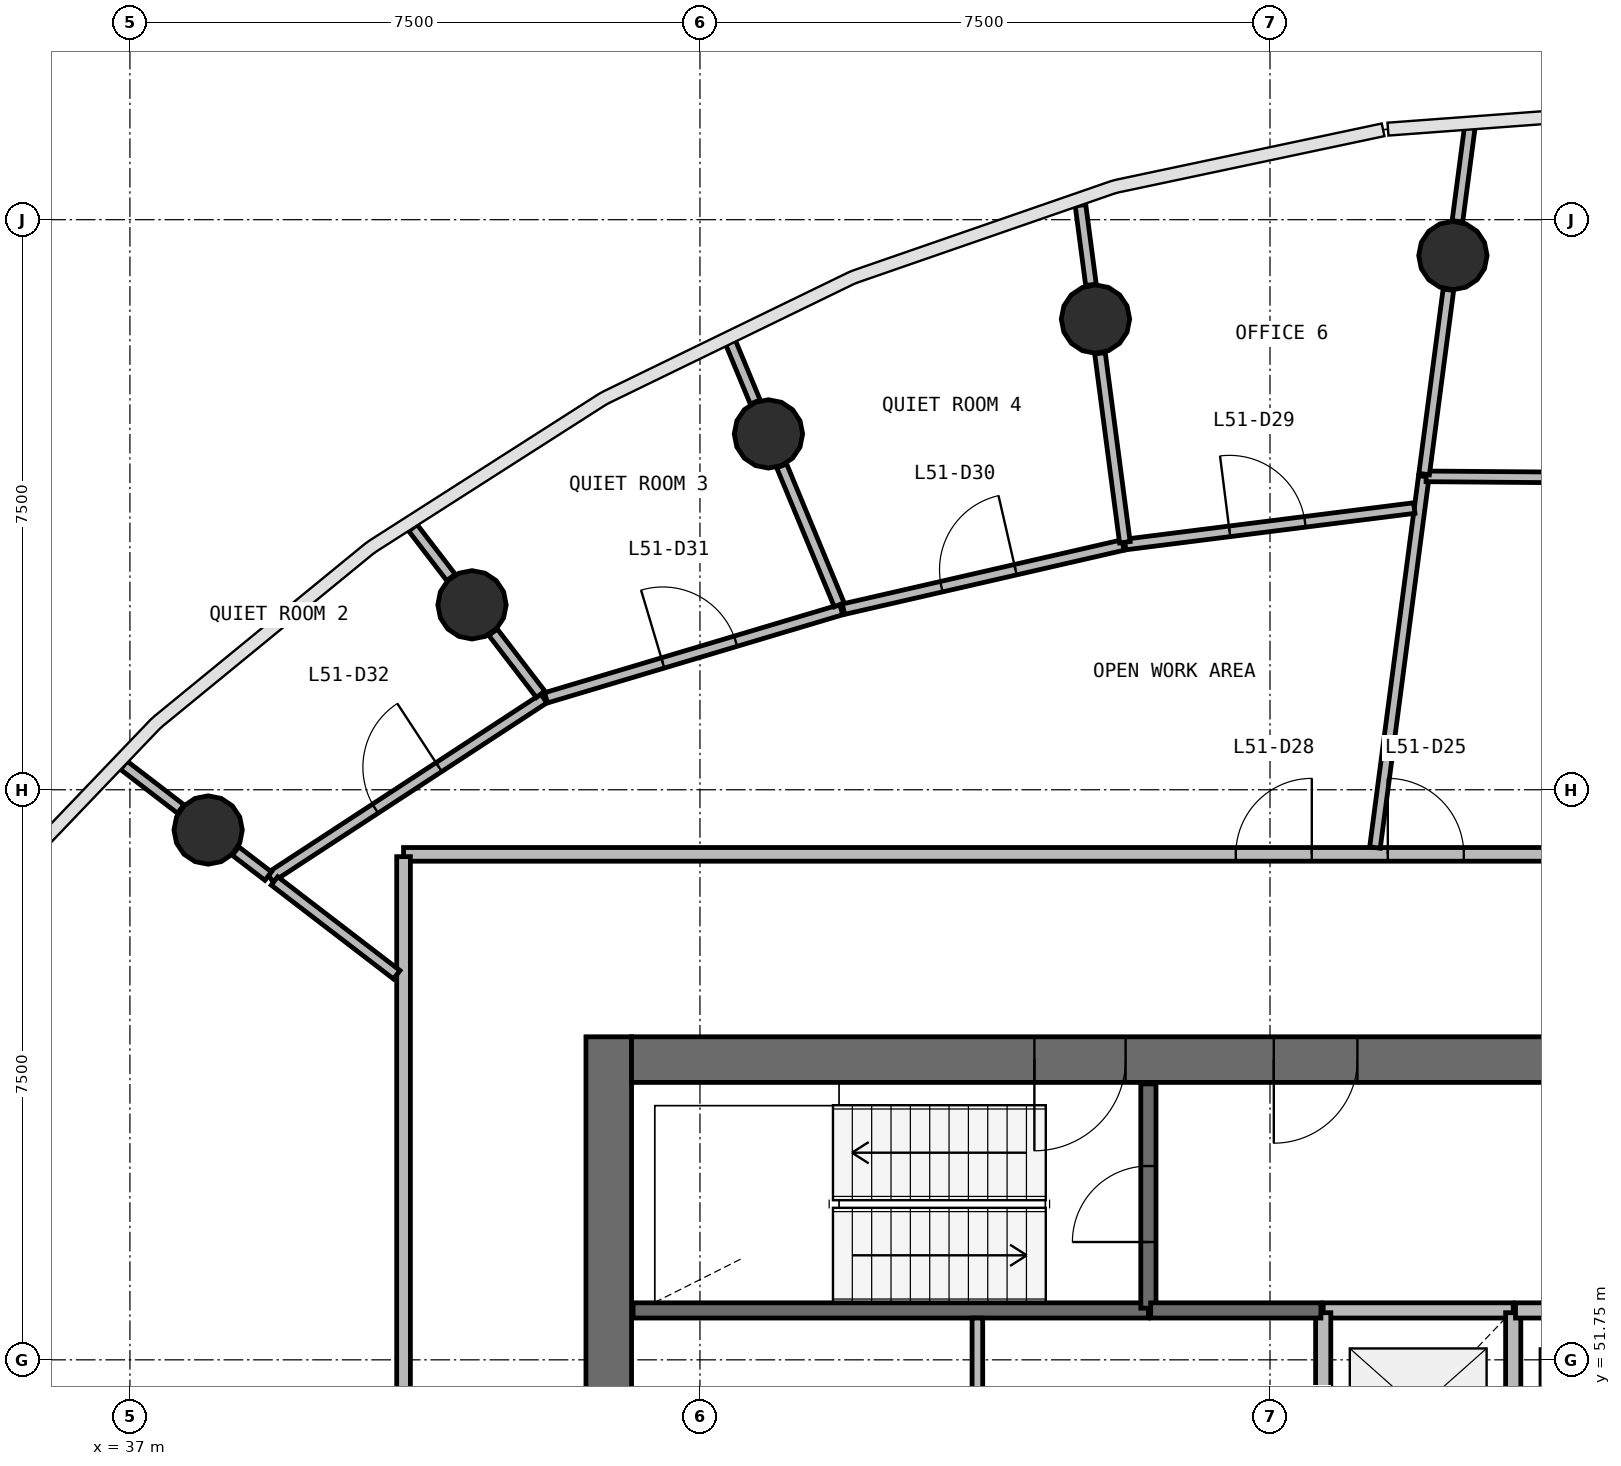
"""IFC4 building model, lengths in metres.
Left out: names, types, materials, properties, quantities, classifications, styles, units other than length and angle.
Written with IfcOpenShell. Run it as: python <this file> out.ifc"""

import sys

from ifc_helpers import new_model, si_unit, direction, frame, frame_2d, origin, origin_2d, place, context, subcontext, project, spatial, rectangle, circle, extrude, source, transform, mapped, element, fill, save


model = new_model("IFC4")
c1 = context("Model", 3, precision=1e-05, world=origin(), true_north=direction((0.0, 1.0)))
c2 = subcontext(c1, "Body", "Model", "MODEL_VIEW")
j1 = project(units=[si_unit("LENGTHUNIT", "METRE"), si_unit("PLANEANGLEUNIT", "RADIAN")], contexts=[c1])
p1 = place(None, origin())
s1 = spatial("IfcSite", under=j1, at=p1, CompositionType="ELEMENT")
p2 = place(p1, origin())
s2 = spatial("IfcBuilding", under=s1, at=p2, CompositionType="ELEMENT")
p3 = place(p2, frame((0.0, 0.0, 211.1)))
s3 = spatial("IfcBuildingStorey", under=s2, at=p3, CompositionType="ELEMENT", Elevation=211.1)
p4 = place(p3, frame((43.3, 56.0, 0.0), z_axis=(0.0, 0.0, 1.0), x_axis=(0.0, -1.0, 0.0)))
e1 = element("IfcWall", 1, at=p4, inside=s3, PredefinedType="SHEAR", context=c2, shape_type="SweptSolid", body=[
    extrude(rectangle(XDim=16.0, YDim=0.6, at=frame_2d((8.0, 0.0))), origin(), (0.0, 0.0, 1.0), 3.9),
])
p5 = place(p4, frame((7.1, 0.0, 0.0)))
e2 = element("IfcOpeningElement", 2, at=p5, cuts=e1, PredefinedType="OPENING", context=c2, shape_type="SweptSolid", body=[
    extrude(rectangle(XDim=1.8, YDim=2.1, at=frame_2d((0.9, 1.05))), frame((0.0, 0.31, 0.0), z_axis=(0.0, -1.0, 0.0), x_axis=(1.0, 0.0, 0.0)), (0.0, 0.0, 1.0), 0.62),
])
p6 = place(p3, frame((60.4, 55.7, 0.0), z_axis=(0.0, 0.0, 1.0), x_axis=(-1.0, 0.0, 0.0)))
e3 = element("IfcWall", 3, at=p6, inside=s3, PredefinedType="SHEAR", context=c2, shape_type="SweptSolid", body=[
    extrude(rectangle(XDim=16.8, YDim=0.6, at=frame_2d((8.4, 0.0))), origin(), (0.0, 0.0, 1.0), 3.9),
])
p7 = place(p6, frame((0.4, 0.0, 0.0)))
e4 = element("IfcOpeningElement", 4, at=p7, cuts=e3, PredefinedType="OPENING", context=c2, shape_type="SweptSolid", body=[
    extrude(rectangle(XDim=1.1, YDim=2.1, at=frame_2d((0.55, 1.05))), frame((0.0, 0.31, 0.0), z_axis=(0.0, -1.0, 0.0), x_axis=(1.0, 0.0, 0.0)), (0.0, 0.0, 1.0), 0.62),
])
p8 = place(p6, frame((10.3, 0.0, 0.0)))
e5 = element("IfcOpeningElement", 5, at=p8, cuts=e3, PredefinedType="OPENING", context=c2, shape_type="SweptSolid", body=[
    extrude(rectangle(XDim=1.2, YDim=2.1, at=frame_2d((0.6, 1.05))), frame((0.0, 0.31, 0.0), z_axis=(0.0, -1.0, 0.0), x_axis=(1.0, 0.0, 0.0)), (0.0, 0.0, 1.0), 0.62),
])
p9 = place(p6, frame((7.25, 0.0, 0.0)))
e6 = element("IfcOpeningElement", 6, at=p9, cuts=e3, PredefinedType="OPENING", context=c2, shape_type="SweptSolid", body=[
    extrude(rectangle(XDim=1.1, YDim=2.1, at=frame_2d((0.55, 1.05))), frame((0.0, 0.31, 0.0), z_axis=(0.0, -1.0, 0.0), x_axis=(1.0, 0.0, 0.0)), (0.0, 0.0, 1.0), 0.62),
])
m1 = source(origin(), c2, "Body", "SweptSolid", [
    extrude(circle(Radius=0.45, at=origin_2d()), origin(), (0.0, 0.0, 1.0), 3.9),
])
for number, where, z_axis, x_axis in (
    (7, (54.406, 66.278, 0.0), (0.0, 0.0, 1.0), (1.0, 0.0, 0.0)),
    (8, (49.704, 65.442, 0.0), (0.0, 0.0, 1.0), (1.0, 0.0, 0.0)),
    (9, (45.401, 63.931, 0.0), (0.0, 0.0, 1.0), (1.0, 0.0, 0.0)),
    (10, (41.501, 61.683, 0.0), (0.0, 0.0, 1.0), (1.0, 0.0, 0.0)),
    (11, (38.029, 58.72, 0.0), (0.0, 0.0, 1.0), (1.0, 0.0, 0.0)),
):
    element("IfcColumn", number, at=place(p3, frame(where, z_axis=z_axis, x_axis=x_axis)), inside=s3, PredefinedType="COLUMN", context=c2, shape_type="MappedRepresentation", body=[
        mapped(m1, transform((0.0, 0.0, 0.0), scale=1.0)),
    ])
p10 = place(p3, frame((43.62, 52.4, 0.0), z_axis=(0.0, 0.0, 1.0), x_axis=(1.0, 0.0, 0.0)))
e12 = element("IfcWall", 12, at=p10, inside=s3, PredefinedType="SOLIDWALL", context=c2, shape_type="SweptSolid", body=[
    extrude(rectangle(XDim=6.78, YDim=0.2, at=frame_2d((3.39, 0.0))), origin(), (0.0, 0.0, 1.0), 3.58),
])
p11 = place(p3, frame((50.4, 52.43, 0.0), z_axis=(0.0, 0.0, 1.0), x_axis=(0.0, 1.0, 0.0)))
e13 = element("IfcWall", 13, at=p11, inside=s3, PredefinedType="SOLIDWALL", context=c2, shape_type="SweptSolid", body=[
    extrude(rectangle(XDim=2.95, YDim=0.2, at=frame_2d((1.475, 0.0))), origin(), (0.0, 0.0, 1.0), 3.58),
])
p12 = place(p11, frame((0.87, 0.0, 0.0)))
e14 = element("IfcOpeningElement", 14, at=p12, cuts=e13, PredefinedType="OPENING", context=c2, shape_type="SweptSolid", body=[
    extrude(rectangle(XDim=1.0, YDim=2.1, at=frame_2d((0.5, 1.05))), frame((0.0, 0.11, 0.0), z_axis=(0.0, -1.0, 0.0), x_axis=(1.0, 0.0, 0.0)), (0.0, 0.0, 1.0), 0.22),
])
p13 = place(p3, frame((55.2, 52.4, 0.0), z_axis=(0.0, 0.0, 1.0), x_axis=(-1.0, 0.0, 0.0)))
e15 = element("IfcWall", 15, at=p13, inside=s3, PredefinedType="SOLIDWALL", context=c2, shape_type="SweptSolid", body=[
    extrude(rectangle(XDim=2.5, YDim=0.2, at=frame_2d((1.25, 0.0))), origin(), (0.0, 0.0, 1.0), 3.58),
])
for number, where, z_axis, x_axis in (
    (16, (52.7, 52.37, 0.0), (0.0, 0.0, 1.0), (0.0, -1.0, 0.0)),
    (17, (55.2, 50.01, 0.0), (0.0, 0.0, 1.0), (0.0, 1.0, 0.0)),
):
    element("IfcWall", number, at=place(p3, frame(where, z_axis=z_axis, x_axis=x_axis)), inside=s3, PredefinedType="SOLIDWALL", context=c2, shape_type="SweptSolid", body=[
        extrude(rectangle(XDim=2.36, YDim=0.2, at=frame_2d((1.18, 0.0))), origin(), (0.0, 0.0, 1.0), 3.58),
    ])
p14 = place(p3, frame((50.43, 52.4, 0.0), z_axis=(0.0, 0.0, 1.0), x_axis=(1.0, 0.0, 0.0)))
e18 = element("IfcWall", 18, at=p14, inside=s3, PredefinedType="SOLIDWALL", context=c2, shape_type="SweptSolid", body=[
    extrude(rectangle(XDim=2.24, YDim=0.2, at=frame_2d((1.12, 0.0))), origin(), (0.0, 0.0, 1.0), 3.58),
])
p15 = place(p3, frame((56.07, 52.4, 0.0), z_axis=(0.0, 0.0, 1.0), x_axis=(-1.0, 0.0, 0.0)))
e19 = element("IfcWall", 19, at=p15, inside=s3, PredefinedType="SOLIDWALL", context=c2, shape_type="SweptSolid", body=[
    extrude(rectangle(XDim=0.84, YDim=0.2, at=frame_2d((0.42, 0.0))), origin(), (0.0, 0.0, 1.0), 3.58),
])
p16 = place(p3, frame((40.6, 58.4, 0.0), z_axis=(0.0, 0.0, 1.0), x_axis=(1.0, 0.0, 0.0)))
e20 = element("IfcWall", 20, at=p16, inside=s3, PredefinedType="PARTITIONING", context=c2, shape_type="SweptSolid", body=[
    extrude(rectangle(XDim=22.8, YDim=0.18, at=frame_2d((11.4, 0.0))), origin(), (0.0, 0.0, 1.0), 2.88),
])
p17 = place(p16, frame((12.95, 0.0, 0.0)))
e21 = element("IfcOpeningElement", 21, at=p17, cuts=e20, PredefinedType="OPENING", context=c2, shape_type="SweptSolid", body=[
    extrude(rectangle(XDim=1.0, YDim=2.1, at=frame_2d((0.5, 1.05))), frame((0.0, 0.1, 0.0), z_axis=(0.0, -1.0, 0.0), x_axis=(1.0, 0.0, 0.0)), (0.0, 0.0, 1.0), 0.2),
])
p18 = place(p16, frame((10.95, 0.0, 0.0)))
e22 = element("IfcOpeningElement", 22, at=p18, cuts=e20, PredefinedType="OPENING", context=c2, shape_type="SweptSolid", body=[
    extrude(rectangle(XDim=1.0, YDim=2.1, at=frame_2d((0.5, 1.05))), frame((0.0, 0.1, 0.0), z_axis=(0.0, -1.0, 0.0), x_axis=(1.0, 0.0, 0.0)), (0.0, 0.0, 1.0), 0.2),
])
p19 = place(p3, frame((40.6, 37.63, 0.0), z_axis=(0.0, 0.0, 1.0), x_axis=(0.0, 1.0, 0.0)))
e23 = element("IfcWall", 23, at=p19, inside=s3, PredefinedType="PARTITIONING", context=c2, shape_type="SweptSolid", body=[
    extrude(rectangle(XDim=20.74, YDim=0.18, at=frame_2d((10.37, 0.0))), origin(), (0.0, 0.0, 1.0), 2.88),
])
p20 = place(p19, frame((9.89, 0.0, 0.0)))
e24 = element("IfcOpeningElement", 24, at=p20, cuts=e23, PredefinedType="OPENING", context=c2, shape_type="SweptSolid", body=[
    extrude(rectangle(XDim=1.0, YDim=2.1, at=frame_2d((0.5, 1.05))), frame((0.0, 0.1, 0.0), z_axis=(0.0, -1.0, 0.0), x_axis=(1.0, 0.0, 0.0)), (0.0, 0.0, 1.0), 0.2),
])
p21 = place(p19, frame((4.29, 0.0, 0.0)))
e25 = element("IfcOpeningElement", 25, at=p21, cuts=e23, PredefinedType="OPENING", context=c2, shape_type="SweptSolid", body=[
    extrude(rectangle(XDim=1.0, YDim=2.1, at=frame_2d((0.5, 1.05))), frame((0.0, 0.1, 0.0), z_axis=(0.0, -1.0, 0.0), x_axis=(1.0, 0.0, 0.0)), (0.0, 0.0, 1.0), 0.2),
])
p22 = place(p3, frame((53.381, 58.49, 0.0), z_axis=(0.0, 0.0, 1.0), x_axis=(0.130510929427, 0.991446870639, 0.0)))
e26 = element("IfcWall", 26, at=p22, inside=s3, PredefinedType="PARTITIONING", context=c2, shape_type="SweptSolid", body=[
    extrude(rectangle(XDim=4.926, YDim=0.14, at=frame_2d((2.463, 0.0))), origin(), (0.0, 0.0, 1.0), 2.88),
])
p23 = place(p3, frame((54.054, 63.373, 0.0), z_axis=(0.0, 0.0, 1.0), x_axis=(0.999969319587, -0.007833255005, 0.0)))
e27 = element("IfcWall", 27, at=p23, inside=s3, PredefinedType="PARTITIONING", context=c2, shape_type="SweptSolid", body=[
    extrude(rectangle(XDim=4.27, YDim=0.14, at=frame_2d((2.135, 0.0))), origin(), (0.0, 0.0, 1.0), 2.88),
])
p24 = place(p23, frame((1.62, 0.0, 0.0)))
e28 = element("IfcOpeningElement", 28, at=p24, cuts=e27, PredefinedType="OPENING", context=c2, shape_type="SweptSolid", body=[
    extrude(rectangle(XDim=1.0, YDim=2.1, at=frame_2d((0.5, 1.05))), frame((0.0, 0.08, 0.0), z_axis=(0.0, -1.0, 0.0), x_axis=(1.0, 0.0, 0.0)), (0.0, 0.0, 1.0), 0.16),
])
p25 = place(p3, frame((38.843, 58.096, 0.0), z_axis=(0.0, 0.0, 1.0), x_axis=(0.83707650684, 0.547085844907, 0.0)))
e29 = element("IfcWall", 29, at=p25, inside=s3, PredefinedType="PARTITIONING", context=c2, shape_type="SweptSolid", body=[
    extrude(rectangle(XDim=4.305, YDim=0.14, at=frame_2d((2.152, 0.0))), origin(), (0.0, 0.0, 1.0), 2.88),
])
p26 = place(p25, frame((1.655, 0.0, 0.0)))
e30 = element("IfcOpeningElement", 30, at=p26, cuts=e29, PredefinedType="OPENING", context=c2, shape_type="SweptSolid", body=[
    extrude(rectangle(XDim=1.0, YDim=2.1, at=frame_2d((0.5, 1.05))), frame((0.0, 0.08, 0.0), z_axis=(0.0, -1.0, 0.0), x_axis=(1.0, 0.0, 0.0)), (0.0, 0.0, 1.0), 0.16),
])
p27 = place(p3, frame((42.475, 60.459, 0.0), z_axis=(0.0, 0.0, 1.0), x_axis=(0.958218274214, 0.286038002655, 0.0)))
e31 = element("IfcWall", 31, at=p27, inside=s3, PredefinedType="PARTITIONING", context=c2, shape_type="SweptSolid", body=[
    extrude(rectangle(XDim=4.053, YDim=0.14, at=frame_2d((2.027, 0.0))), origin(), (0.0, 0.0, 1.0), 2.88),
])
p28 = place(p27, frame((1.603, 0.0, 0.0)))
e32 = element("IfcOpeningElement", 32, at=p28, cuts=e31, PredefinedType="OPENING", context=c2, shape_type="SweptSolid", body=[
    extrude(rectangle(XDim=1.0, YDim=2.1, at=frame_2d((0.5, 1.05))), frame((0.0, 0.08, 0.0), z_axis=(0.0, -1.0, 0.0), x_axis=(1.0, 0.0, 0.0)), (0.0, 0.0, 1.0), 0.16),
])
p29 = place(p3, frame((50.094, 62.476, 0.0), z_axis=(0.0, 0.0, 1.0), x_axis=(0.99213420041, 0.12517878565, 0.0)))
e33 = element("IfcWall", 33, at=p29, inside=s3, PredefinedType="PARTITIONING", context=c2, shape_type="SweptSolid", body=[
    extrude(rectangle(XDim=3.834, YDim=0.14, at=frame_2d((1.917, 0.0))), origin(), (0.0, 0.0, 1.0), 2.88),
])
p30 = place(p29, frame((1.385, 0.0, 0.0)))
e34 = element("IfcOpeningElement", 34, at=p30, cuts=e33, PredefinedType="OPENING", context=c2, shape_type="SweptSolid", body=[
    extrude(rectangle(XDim=1.0, YDim=2.1, at=frame_2d((0.5, 1.05))), frame((0.0, 0.08, 0.0), z_axis=(0.0, -1.0, 0.0), x_axis=(1.0, 0.0, 0.0)), (0.0, 0.0, 1.0), 0.16),
])
p31 = place(p3, frame((46.388, 61.626, 0.0), z_axis=(0.0, 0.0, 1.0), x_axis=(0.974668578249, 0.223654113699, 0.0)))
e35 = element("IfcWall", 35, at=p31, inside=s3, PredefinedType="PARTITIONING", context=c2, shape_type="SweptSolid", body=[
    extrude(rectangle(XDim=3.772, YDim=0.14, at=frame_2d((1.886, 0.0))), origin(), (0.0, 0.0, 1.0), 2.88),
])
p32 = place(p31, frame((1.323, 0.0, 0.0)))
e36 = element("IfcOpeningElement", 36, at=p32, cuts=e35, PredefinedType="OPENING", context=c2, shape_type="SweptSolid", body=[
    extrude(rectangle(XDim=1.0, YDim=2.1, at=frame_2d((0.5, 1.05))), frame((0.0, 0.08, 0.0), z_axis=(0.0, -1.0, 0.0), x_axis=(1.0, 0.0, 0.0)), (0.0, 0.0, 1.0), 0.16),
])
p33 = place(p3, frame((54.028, 63.403, 0.0), z_axis=(0.0, 0.0, 1.0), x_axis=(0.130581052229, 0.991437637373, 0.0)))
e37 = element("IfcWall", 37, at=p33, inside=s3, PredefinedType="PARTITIONING", context=c2, shape_type="SweptSolid", body=[
    extrude(rectangle(XDim=2.446, YDim=0.14, at=frame_2d((1.223, 0.0))), origin(), (0.0, 0.0, 1.0), 2.88),
])
p34 = place(p3, frame((38.39, 58.444, 0.0), z_axis=(0.0, 0.0, 1.0), x_axis=(0.793294129055, -0.608838586825, 0.0)))
e38 = element("IfcWall", 38, at=p34, inside=s3, PredefinedType="PARTITIONING", context=c2, shape_type="SweptSolid", body=[
    extrude(rectangle(XDim=0.541, YDim=0.14, at=frame_2d((0.271, 0.0))), origin(), (0.0, 0.0, 1.0), 2.88),
])
p35 = place(p3, frame((38.902, 58.051, 0.0), z_axis=(0.0, 0.0, 1.0), x_axis=(0.7933756116, -0.608732403374, 0.0)))
e39 = element("IfcWall", 39, at=p35, inside=s3, PredefinedType="PARTITIONING", context=c2, shape_type="SweptSolid", body=[
    extrude(rectangle(XDim=2.027, YDim=0.14, at=frame_2d((1.013, 0.0))), origin(), (0.0, 0.0, 1.0), 2.88),
])
p36 = place(p3, frame((50.09, 62.506, 0.0), z_axis=(0.0, 0.0, 1.0), x_axis=(-0.130479700893, 0.991450980964, 0.0)))
e40 = element("IfcWall", 40, at=p36, inside=s3, PredefinedType="PARTITIONING", context=c2, shape_type="SweptSolid", body=[
    extrude(rectangle(XDim=2.507, YDim=0.14, at=frame_2d((1.254, 0.0))), origin(), (0.0, 0.0, 1.0), 2.88),
])
p37 = place(p3, frame((48.15, 50.01, 0.0), z_axis=(0.0, 0.0, 1.0), x_axis=(0.0, 1.0, 0.0)))
e41 = element("IfcWall", 41, at=p37, inside=s3, PredefinedType="PARTITIONING", context=c2, shape_type="SweptSolid", body=[
    extrude(rectangle(XDim=2.29, YDim=0.14, at=frame_2d((1.145, 0.0))), origin(), (0.0, 0.0, 1.0), 2.88),
])
p38 = place(p3, frame((46.332, 61.684, 0.0), z_axis=(0.0, 0.0, 1.0), x_axis=(-0.382624406385, 0.923903979664, 0.0)))
e42 = element("IfcWall", 42, at=p38, inside=s3, PredefinedType="PARTITIONING", context=c2, shape_type="SweptSolid", body=[
    extrude(rectangle(XDim=1.977, YDim=0.14, at=frame_2d((0.989, 0.0))), origin(), (0.0, 0.0, 1.0), 2.88),
])
p39 = place(p3, frame((54.466, 66.729, 0.0), z_axis=(0.0, 0.0, 1.0), x_axis=(0.130520415919, 0.991445621821, 0.0)))
e43 = element("IfcWall", 43, at=p39, inside=s3, PredefinedType="PARTITIONING", context=c2, shape_type="SweptSolid", body=[
    extrude(rectangle(XDim=1.246, YDim=0.14, at=frame_2d((0.623, 0.0))), origin(), (0.0, 0.0, 1.0), 2.88),
])
p40 = place(p3, frame((42.403, 60.507, 0.0), z_axis=(0.0, 0.0, 1.0), x_axis=(-0.608700642645, 0.793399979609, 0.0)))
e44 = element("IfcWall", 44, at=p40, inside=s3, PredefinedType="PARTITIONING", context=c2, shape_type="SweptSolid", body=[
    extrude(rectangle(XDim=1.028, YDim=0.14, at=frame_2d((0.514, 0.0))), origin(), (0.0, 0.0, 1.0), 2.88),
])
p41 = place(p3, frame((49.644, 65.893, 0.0), z_axis=(0.0, 0.0, 1.0), x_axis=(-0.130436565077, 0.99145665689, 0.0)))
e45 = element("IfcWall", 45, at=p41, inside=s3, PredefinedType="PARTITIONING", context=c2, shape_type="SweptSolid", body=[
    extrude(rectangle(XDim=1.056, YDim=0.14, at=frame_2d((0.528, 0.0))), origin(), (0.0, 0.0, 1.0), 2.88),
])
p42 = place(p3, frame((37.668, 58.997, 0.0), z_axis=(0.0, 0.0, 1.0), x_axis=(-0.793344167197, 0.608773383431, 0.0)))
e46 = element("IfcWall", 46, at=p42, inside=s3, PredefinedType="PARTITIONING", context=c2, shape_type="SweptSolid", body=[
    extrude(rectangle(XDim=0.944, YDim=0.14, at=frame_2d((0.472, 0.0))), origin(), (0.0, 0.0, 1.0), 2.88),
])
p43 = place(p3, frame((45.227, 64.352, 0.0), z_axis=(0.0, 0.0, 1.0), x_axis=(-0.382754217383, 0.92385020922, 0.0)))
e47 = element("IfcWall", 47, at=p43, inside=s3, PredefinedType="PARTITIONING", context=c2, shape_type="SweptSolid", body=[
    extrude(rectangle(XDim=0.857, YDim=0.14, at=frame_2d((0.429, 0.0))), origin(), (0.0, 0.0, 1.0), 2.88),
])
p44 = place(p3, frame((41.224, 62.044, 0.0), z_axis=(0.0, 0.0, 1.0), x_axis=(-0.608936045201, 0.793219322038, 0.0)))
e48 = element("IfcWall", 48, at=p44, inside=s3, PredefinedType="PARTITIONING", context=c2, shape_type="SweptSolid", body=[
    extrude(rectangle(XDim=0.823, YDim=0.14, at=frame_2d((0.411, 0.0))), origin(), (0.0, 0.0, 1.0), 2.88),
])
m2 = source(origin(), c2, "Body", "SweptSolid", [
    extrude(rectangle(XDim=1.2, YDim=2.1, at=frame_2d((0.6, 1.05))), frame((0.0, 0.025, 0.0), z_axis=(0.0, -1.0, 0.0), x_axis=(1.0, 0.0, 0.0)), (0.0, 0.0, 1.0), 0.05),
])
p45 = place(p8, origin())
e49 = element("IfcDoor", 49, at=p45, inside=s3, OperationType="SINGLE_SWING_RIGHT", PredefinedType="DOOR", context=c2, shape_type="MappedRepresentation", body=[
    mapped(m2, transform((0.0, 0.0, 0.0), scale=1.0)),
])
fill(e5, e49)
m3 = source(origin(), c2, "Body", "SweptSolid", [
    extrude(rectangle(XDim=1.0, YDim=2.1, at=frame_2d((0.5, 1.05))), frame((0.0, 0.025, 0.0), z_axis=(0.0, -1.0, 0.0), x_axis=(1.0, 0.0, 0.0)), (0.0, 0.0, 1.0), 0.05),
])
p46 = place(p12, origin())
e50 = element("IfcDoor", 50, at=p46, inside=s3, OperationType="SINGLE_SWING_LEFT", PredefinedType="DOOR", context=c2, shape_type="MappedRepresentation", body=[
    mapped(m3, transform((0.0, 0.0, 0.0), scale=1.0)),
])
fill(e14, e50)
m4 = source(origin(), c2, "Body", "SweptSolid", [
    extrude(rectangle(XDim=1.1, YDim=2.1, at=frame_2d((0.55, 1.05))), frame((0.0, 0.025, 0.0), z_axis=(0.0, -1.0, 0.0), x_axis=(1.0, 0.0, 0.0)), (0.0, 0.0, 1.0), 0.05),
])
p47 = place(p9, origin())
e51 = element("IfcDoor", 51, at=p47, inside=s3, OperationType="SINGLE_SWING_RIGHT", PredefinedType="DOOR", context=c2, shape_type="MappedRepresentation", body=[
    mapped(m4, transform((0.0, 0.0, 0.0), scale=1.0)),
])
fill(e6, e51)
m5 = source(origin(), c2, "Body", "SweptSolid", [
    extrude(rectangle(XDim=1.0, YDim=2.1, at=frame_2d((0.5, 1.05))), frame((0.0, 0.025, 0.0), z_axis=(0.0, -1.0, 0.0), x_axis=(1.0, 0.0, 0.0)), (0.0, 0.0, 1.0), 0.05),
])
p48 = place(p17, origin())
e52 = element("IfcDoor", 52, at=p48, inside=s3, OperationType="SINGLE_SWING_LEFT", PredefinedType="DOOR", context=c2, shape_type="MappedRepresentation", body=[
    mapped(m5, transform((0.0, 0.0, 0.0), scale=1.0)),
])
fill(e21, e52)
p49 = place(p18, origin())
e53 = element("IfcDoor", 53, at=p49, inside=s3, OperationType="SINGLE_SWING_RIGHT", PredefinedType="DOOR", context=c2, shape_type="MappedRepresentation", body=[
    mapped(m5, transform((0.0, 0.0, 0.0), scale=1.0)),
])
fill(e22, e53)
p50 = place(p30, origin())
e54 = element("IfcDoor", 54, at=p50, inside=s3, OperationType="SINGLE_SWING_LEFT", PredefinedType="DOOR", context=c2, shape_type="MappedRepresentation", body=[
    mapped(m5, transform((0.0, 0.0, 0.0), scale=1.0)),
])
fill(e34, e54)
p51 = place(p32, origin())
e55 = element("IfcDoor", 55, at=p51, inside=s3, OperationType="SINGLE_SWING_RIGHT", PredefinedType="DOOR", context=c2, shape_type="MappedRepresentation", body=[
    mapped(m5, transform((0.0, 0.0, 0.0), scale=1.0)),
])
fill(e36, e55)
p52 = place(p28, origin())
e56 = element("IfcDoor", 56, at=p52, inside=s3, OperationType="SINGLE_SWING_LEFT", PredefinedType="DOOR", context=c2, shape_type="MappedRepresentation", body=[
    mapped(m5, transform((0.0, 0.0, 0.0), scale=1.0)),
])
fill(e32, e56)
p53 = place(p26, origin())
e57 = element("IfcDoor", 57, at=p53, inside=s3, OperationType="SINGLE_SWING_RIGHT", PredefinedType="DOOR", context=c2, shape_type="MappedRepresentation", body=[
    mapped(m5, transform((0.0, 0.0, 0.0), scale=1.0)),
])
fill(e30, e57)
save(model, sys.argv[1])
